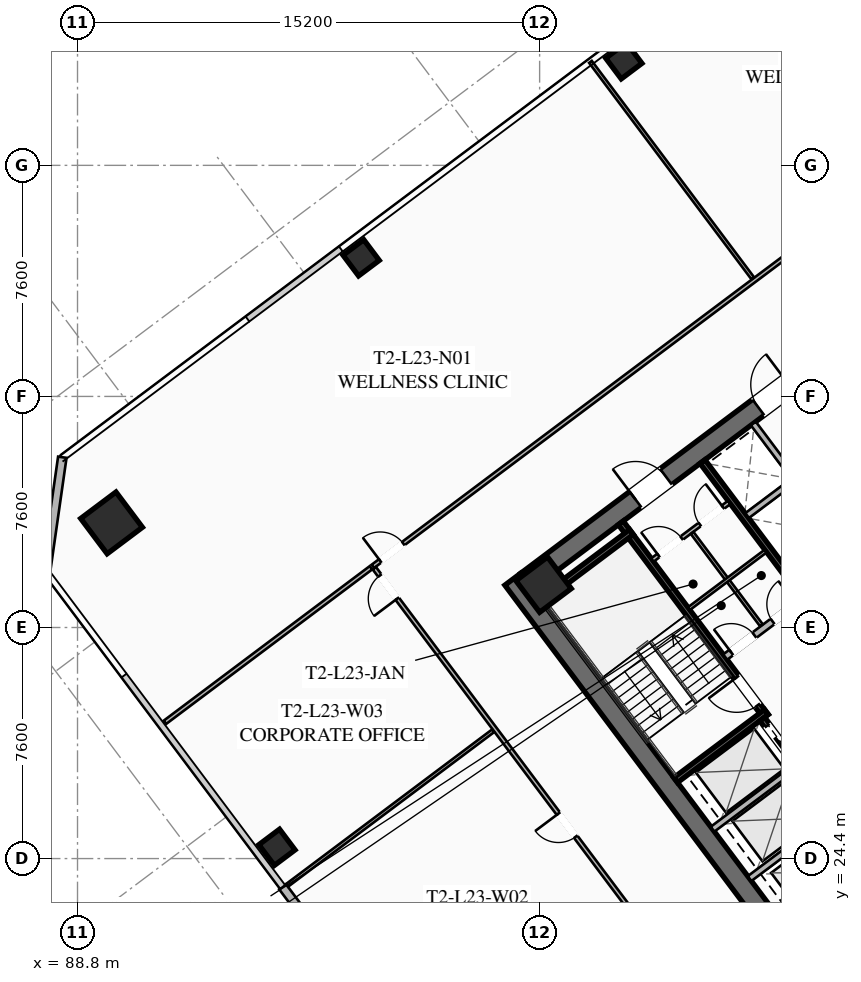
"""IFC4 building model, lengths in metres.
Left out: names, types, materials, properties, quantities, classifications, styles, units other than length and angle.
Written with IfcOpenShell. Run it as: python <this file> out.ifc"""

import sys

from ifc_helpers import new_model, si_unit, direction, frame, frame_2d, origin, origin_2d, place, context, subcontext, project, spatial, rectangle, hollow_rectangle, extrude, element, fill, save


model = new_model("IFC4")
c1 = context("Model", 3, precision=1e-05, world=origin(), true_north=direction((0.0, 1.0)))
c2 = subcontext(c1, "Body", "Model", "MODEL_VIEW")
j1 = project(units=[si_unit("LENGTHUNIT", "METRE"), si_unit("PLANEANGLEUNIT", "RADIAN")], contexts=[c1])
p1 = place(None, origin())
s1 = spatial("IfcSite", under=j1, at=p1, CompositionType="ELEMENT")
p2 = place(p1, origin())
s2 = spatial("IfcBuilding", under=s1, at=p2, CompositionType="ELEMENT")
p3 = place(p2, frame((0.0, 0.0, 88.5)))
s3 = spatial("IfcBuildingStorey", under=s2, at=p3, CompositionType="ELEMENT", Elevation=88.5)
p4 = place(p3, frame((112.476, 21.107, 0.0), z_axis=(0.0, 0.0, 1.0), x_axis=(-0.600005007985, 0.799996243986, 0.0)))
e1 = element("IfcWall", 1, at=p4, inside=s3, PredefinedType="SHEAR", context=c2, shape_type="SweptSolid", body=[
    extrude(rectangle(XDim=15.6, YDim=0.65, at=frame_2d((7.8, 0.0))), origin(), (0.0, 0.0, 1.0), 3.55),
])
p5 = place(p3, frame((103.571, 33.522, 0.0), z_axis=(0.0, 0.0, 1.0), x_axis=(0.799998028465, 0.600002628705, 0.0)))
e2 = element("IfcWall", 2, at=p5, inside=s3, PredefinedType="SHEAR", context=c2, shape_type="SweptSolid", body=[
    extrude(rectangle(XDim=14.86, YDim=0.65, at=frame_2d((7.43, 0.0))), origin(), (0.0, 0.0, 1.0), 3.55),
])
p6 = place(p5, frame((4.48, 0.0, 0.0)))
e3 = element("IfcOpeningElement", 3, at=p6, cuts=e2, PredefinedType="OPENING", context=c2, shape_type="SweptSolid", body=[
    extrude(rectangle(XDim=1.25, YDim=2.25, at=frame_2d((0.625, 1.125))), frame((0.0, 0.335, 0.0), z_axis=(0.0, -1.0, 0.0), x_axis=(1.0, 0.0, 0.0)), (0.0, 0.0, 1.0), 0.67),
])
p7 = place(p5, frame((9.53, 0.0, 0.0)))
e4 = element("IfcOpeningElement", 4, at=p7, cuts=e2, PredefinedType="OPENING", context=c2, shape_type="SweptSolid", body=[
    extrude(rectangle(XDim=1.25, YDim=2.25, at=frame_2d((0.625, 1.125))), frame((0.0, 0.335, 0.0), z_axis=(0.0, -1.0, 0.0), x_axis=(1.0, 0.0, 0.0)), (0.0, 0.0, 1.0), 0.67),
])
for number, where, z_axis, x_axis in (
    (5, (112.59, 22.13, 0.0), (0.0, 0.0, 1.0), (0.8, 0.6, 0.0)),
    (6, (104.13, 33.41, 0.0), (0.0, 0.0, 1.0), (0.8, 0.6, 0.0)),
):
    element("IfcColumn", number, at=place(p3, frame(where, z_axis=z_axis, x_axis=x_axis)), inside=s3, PredefinedType="COLUMN", context=c2, shape_type="SweptSolid", body=[
        extrude(hollow_rectangle(XDim=1.3, YDim=1.3, WallThickness=0.05, at=origin_2d()), origin(), (0.0, 0.0, 1.0), 3.35),
    ])
p8 = place(p3, frame((89.92, 35.44, 0.0), z_axis=(0.0, 0.0, 1.0), x_axis=(0.799999996291, 0.600000004945, 0.0)))
e7 = element("IfcColumn", 7, at=p8, inside=s3, PredefinedType="COLUMN", context=c2, shape_type="SweptSolid", body=[
    extrude(hollow_rectangle(XDim=1.45, YDim=1.45, WallThickness=0.055, at=origin_2d()), origin(), (0.0, 0.0, 1.0), 3.35),
])
for number, where, z_axis, x_axis in (
    (8, (106.77, 50.64, 0.0), (0.0, 0.0, 1.0), (0.8, 0.6, 0.0)),
    (9, (98.13, 44.16, 0.0), (0.0, 0.0, 1.0), (0.8, 0.6, 0.0)),
    (10, (95.36, 24.77, 0.0), (0.0, 0.0, 1.0), (0.8, 0.6, 0.0)),
):
    element("IfcColumn", number, at=place(p3, frame(where, z_axis=z_axis, x_axis=x_axis)), inside=s3, PredefinedType="COLUMN", context=c2, shape_type="SweptSolid", body=[
        extrude(hollow_rectangle(XDim=0.85, YDim=0.85, WallThickness=0.035, at=origin_2d()), origin(), (0.0, 0.0, 1.0), 3.35),
    ])
p9 = place(p3, frame((100.646, 16.672, 0.0), z_axis=(0.0, 0.0, 1.0), x_axis=(-0.600018382406, 0.799986212866, 0.0)))
e11 = element("IfcWall", 11, at=p9, inside=s3, PredefinedType="SOLIDWALL", context=c2, shape_type="SweptSolid", body=[
    extrude(rectangle(XDim=8.5, YDim=0.28, at=frame_2d((4.25, 0.0))), origin(), (0.0, 0.0, 1.0), 3.35),
])
p10 = place(p9, frame((3.6, 0.0, 0.0)))
e12 = element("IfcOpeningElement", 12, at=p10, cuts=e11, PredefinedType="OPENING", context=c2, shape_type="SweptSolid", body=[
    extrude(rectangle(XDim=1.3, YDim=2.15, at=frame_2d((0.65, 1.075))), frame((0.0, 0.15, 0.0), z_axis=(0.0, -1.0, 0.0), x_axis=(1.0, 0.0, 0.0)), (0.0, 0.0, 1.0), 0.3),
])
p11 = place(p9, frame((1.46, 0.0, 0.85)))
e13 = element("IfcOpeningElement", 13, at=p11, cuts=e11, PredefinedType="OPENING", context=c2, shape_type="SweptSolid", body=[
    extrude(rectangle(XDim=1.8, YDim=1.92, at=frame_2d((0.9, 0.96))), frame((0.0, 0.15, 0.0), z_axis=(0.0, -1.0, 0.0), x_axis=(1.0, 0.0, 0.0)), (0.0, 0.0, 1.0), 0.3),
])
p12 = place(p3, frame((87.76, 33.82, 0.0), z_axis=(0.0, 0.0, 1.0), x_axis=(0.141430307517, 0.989948214866, 0.0)))
e14 = element("IfcWall", 14, at=p12, inside=s3, PredefinedType="SOLIDWALL", context=c2, shape_type="SweptSolid", body=[
    extrude(rectangle(XDim=3.818, YDim=0.28, at=frame_2d((1.909, 0.0))), origin(), (0.0, 0.0, 1.0), 3.35),
])
p13 = place(p3, frame((111.44, 29.08, 0.0), z_axis=(0.0, 0.0, 1.0), x_axis=(-0.600009827119, 0.799992629566, 0.0)))
e15 = element("IfcWall", 15, at=p13, inside=s3, PredefinedType="SHEAR", context=c2, shape_type="SweptSolid", body=[
    extrude(rectangle(XDim=7.95, YDim=0.2, at=frame_2d((3.975, 0.0))), origin(), (0.0, 0.0, 1.0), 3.35),
])
p14 = place(p13, frame((0.45, 0.0, 0.0)))
e16 = element("IfcOpeningElement", 16, at=p14, cuts=e15, PredefinedType="OPENING", context=c2, shape_type="SweptSolid", body=[
    extrude(rectangle(XDim=1.15, YDim=2.2, at=frame_2d((0.575, 1.1))), frame((0.0, 0.11, 0.0), z_axis=(0.0, -1.0, 0.0), x_axis=(1.0, 0.0, 0.0)), (0.0, 0.0, 1.0), 0.22),
])
for number, where, z_axis, x_axis in (
    (17, (108.476, 26.982, 0.0), (0.0, 0.0, 1.0), (0.8, 0.6, 0.0)),
    (18, (104.036, 32.902, 0.0), (0.0, 0.0, 1.0), (0.8, 0.6, 0.0)),
):
    element("IfcWall", number, at=place(p3, frame(where, z_axis=z_axis, x_axis=x_axis)), inside=s3, PredefinedType="SHEAR", context=c2, shape_type="SweptSolid", body=[
        extrude(rectangle(XDim=3.73, YDim=0.2, at=frame_2d((1.865, 0.0))), origin(), (0.0, 0.0, 1.0), 3.35),
    ])
p15 = place(p3, frame((117.938, 26.016, 0.0), z_axis=(0.0, 0.0, 1.0), x_axis=(-0.600005463273, 0.799995902516, 0.0)))
e19 = element("IfcWall", 19, at=p15, inside=s3, PredefinedType="SHEAR", context=c2, shape_type="SweptSolid", body=[
    extrude(rectangle(XDim=14.3, YDim=0.2, at=frame_2d((7.15, 0.0))), origin(), (0.0, 0.0, 1.0), 3.35),
])
p16 = place(p3, frame((110.104, 31.028, 0.0), z_axis=(0.0, 0.0, 1.0), x_axis=(0.800018601094, 0.59997519774, 0.0)))
e20 = element("IfcWall", 20, at=p16, inside=s3, PredefinedType="SOLIDWALL", context=c2, shape_type="SweptSolid", body=[
    extrude(rectangle(XDim=3.15, YDim=0.22, at=frame_2d((1.575, 0.0))), origin(), (0.0, 0.0, 1.0), 2.703),
])
p17 = place(p16, frame((0.25, 0.0, 0.0)))
e21 = element("IfcOpeningElement", 21, at=p17, cuts=e20, PredefinedType="OPENING", context=c2, shape_type="SweptSolid", body=[
    extrude(rectangle(XDim=0.95, YDim=2.05, at=frame_2d((0.475, 1.025))), frame((0.0, 0.12, 0.0), z_axis=(0.0, -1.0, 0.0), x_axis=(1.0, 0.0, 0.0)), (0.0, 0.0, 1.0), 0.24),
])
p18 = place(p16, frame((1.95, 0.0, 0.0)))
e22 = element("IfcOpeningElement", 22, at=p18, cuts=e20, PredefinedType="OPENING", context=c2, shape_type="SweptSolid", body=[
    extrude(rectangle(XDim=0.95, YDim=2.05, at=frame_2d((0.475, 1.025))), frame((0.0, 0.12, 0.0), z_axis=(0.0, -1.0, 0.0), x_axis=(1.0, 0.0, 0.0)), (0.0, 0.0, 1.0), 0.24),
])
p19 = place(p3, frame((115.13, 23.91, 0.0), z_axis=(0.0, 0.0, 1.0), x_axis=(-0.599975393228, 0.800018454488, 0.0)))
e23 = element("IfcWall", 23, at=p19, inside=s3, PredefinedType="SHEAR", context=c2, shape_type="SweptSolid", body=[
    extrude(rectangle(XDim=6.35, YDim=0.2, at=frame_2d((3.175, 0.0))), origin(), (0.0, 0.0, 1.0), 3.35),
])
p20 = place(p19, frame((4.775, 0.0, 0.0)))
e24 = element("IfcOpeningElement", 24, at=p20, cuts=e23, PredefinedType="OPENING", context=c2, shape_type="SweptSolid", body=[
    extrude(rectangle(XDim=1.3, YDim=2.25, at=frame_2d((0.65, 1.125))), frame((0.0, 0.11, 0.0), z_axis=(0.0, -1.0, 0.0), x_axis=(1.0, 0.0, 0.0)), (0.0, 0.0, 1.0), 0.22),
])
p21 = place(p19, frame((2.775, 0.0, 0.0)))
e25 = element("IfcOpeningElement", 25, at=p21, cuts=e23, PredefinedType="OPENING", context=c2, shape_type="SweptSolid", body=[
    extrude(rectangle(XDim=1.3, YDim=2.25, at=frame_2d((0.65, 1.125))), frame((0.0, 0.11, 0.0), z_axis=(0.0, -1.0, 0.0), x_axis=(1.0, 0.0, 0.0)), (0.0, 0.0, 1.0), 0.22),
])
p22 = place(p19, frame((0.575, 0.0, 0.0)))
e26 = element("IfcOpeningElement", 26, at=p22, cuts=e23, PredefinedType="OPENING", context=c2, shape_type="SweptSolid", body=[
    extrude(rectangle(XDim=1.3, YDim=2.25, at=frame_2d((0.65, 1.125))), frame((0.0, 0.11, 0.0), z_axis=(0.0, -1.0, 0.0), x_axis=(1.0, 0.0, 0.0)), (0.0, 0.0, 1.0), 0.22),
])
for number, where, z_axis, x_axis in (
    (27, (110.906, 23.742, 0.0), (0.0, 0.0, 1.0), (0.8, 0.6, 0.0)),
    (28, (109.688, 25.366, 0.0), (0.0, 0.0, 1.0), (0.8, 0.6, 0.0)),
):
    element("IfcWall", number, at=place(p3, frame(where, z_axis=z_axis, x_axis=x_axis)), inside=s3, PredefinedType="SOLIDWALL", context=c2, shape_type="SweptSolid", body=[
        extrude(rectangle(XDim=3.38, YDim=0.2, at=frame_2d((1.69, 0.0))), origin(), (0.0, 0.0, 1.0), 3.35),
    ])
p23 = place(p3, frame((107.71, 34.22, 0.0), z_axis=(0.0, 0.0, 1.0), x_axis=(0.799981399002, 0.60002480053, 0.0)))
e29 = element("IfcWall", 29, at=p23, inside=s3, PredefinedType="PARTITIONING", context=c2, shape_type="SweptSolid", body=[
    extrude(rectangle(XDim=3.15, YDim=0.135, at=frame_2d((1.575, 0.0))), origin(), (0.0, 0.0, 1.0), 2.703),
])
p24 = place(p23, frame((0.25, 0.0, 0.0)))
e30 = element("IfcOpeningElement", 30, at=p24, cuts=e29, PredefinedType="OPENING", context=c2, shape_type="SweptSolid", body=[
    extrude(rectangle(XDim=0.95, YDim=2.05, at=frame_2d((0.475, 1.025))), frame((0.0, 0.077, 0.0), z_axis=(0.0, -1.0, 0.0), x_axis=(1.0, 0.0, 0.0)), (0.0, 0.0, 1.0), 0.155),
])
p25 = place(p23, frame((1.95, 0.0, 0.0)))
e31 = element("IfcOpeningElement", 31, at=p25, cuts=e29, PredefinedType="OPENING", context=c2, shape_type="SweptSolid", body=[
    extrude(rectangle(XDim=0.95, YDim=2.05, at=frame_2d((0.475, 1.025))), frame((0.0, 0.077, 0.0), z_axis=(0.0, -1.0, 0.0), x_axis=(1.0, 0.0, 0.0)), (0.0, 0.0, 1.0), 0.155),
])
p26 = place(p3, frame((111.296, 32.072, 0.0), z_axis=(0.0, 0.0, 1.0), x_axis=(-0.59995887973, 0.800030838552, 0.0)))
e32 = element("IfcWall", 32, at=p26, inside=s3, PredefinedType="PARTITIONING", context=c2, shape_type="SweptSolid", body=[
    extrude(rectangle(XDim=3.8, YDim=0.11, at=frame_2d((1.9, 0.0))), origin(), (0.0, 0.0, 1.0), 2.703),
])
p27 = place(p3, frame((108.91, 32.62, 0.0), z_axis=(0.0, 0.0, 1.0), x_axis=(0.800018601094, 0.59997519774, 0.0)))
e33 = element("IfcWall", 33, at=p27, inside=s3, PredefinedType="PARTITIONING", context=c2, shape_type="SweptSolid", body=[
    extrude(rectangle(XDim=3.15, YDim=0.11, at=frame_2d((1.575, 0.0))), origin(), (0.0, 0.0, 1.0), 2.703),
])
p28 = place(p3, frame((115.11, 33.27, 0.0), z_axis=(0.0, 0.0, 1.0), x_axis=(-0.600011488909, 0.79999138319, 0.0)))
e34 = element("IfcWall", 34, at=p28, inside=s3, PredefinedType="SOLIDWALL", context=c2, shape_type="SweptSolid", body=[
    extrude(rectangle(XDim=6.8, YDim=0.2, at=frame_2d((3.4, 0.0))), origin(), (0.0, 0.0, 1.0), 3.35),
])
p29 = place(p3, frame((110.826, 35.682, 0.0), z_axis=(0.0, 0.0, 1.0), x_axis=(0.799984418148, 0.600020775241, 0.0)))
e35 = element("IfcWall", 35, at=p29, inside=s3, PredefinedType="SOLIDWALL", context=c2, shape_type="SweptSolid", body=[
    extrude(rectangle(XDim=1.88, YDim=0.2, at=frame_2d((0.94, 0.0))), origin(), (0.0, 0.0, 1.0), 3.35),
])
p30 = place(p3, frame((98.516, 34.012, 0.0), z_axis=(0.0, 0.0, 1.0), x_axis=(0.8, 0.6, 0.0)))
e36 = element("IfcWall", 36, at=p30, inside=s3, PredefinedType="PARTITIONING", context=c2, shape_type="SweptSolid", body=[
    extrude(rectangle(XDim=28.23, YDim=0.135, at=frame_2d((14.115, 0.0))), origin(), (0.0, 0.0, 1.0), 2.703),
])
p31 = place(p30, frame((0.3, 0.0, 0.0)))
e37 = element("IfcOpeningElement", 37, at=p31, cuts=e36, PredefinedType="OPENING", context=c2, shape_type="SweptSolid", body=[
    extrude(rectangle(XDim=0.95, YDim=2.05, at=frame_2d((0.475, 1.025))), frame((0.0, 0.077, 0.0), z_axis=(0.0, -1.0, 0.0), x_axis=(1.0, 0.0, 0.0)), (0.0, 0.0, 1.0), 0.155),
])
p32 = place(p30, frame((26.98, 0.0, 0.0)))
e38 = element("IfcOpeningElement", 38, at=p32, cuts=e36, PredefinedType="OPENING", context=c2, shape_type="SweptSolid", body=[
    extrude(rectangle(XDim=0.95, YDim=2.05, at=frame_2d((0.475, 1.025))), frame((0.0, 0.077, 0.0), z_axis=(0.0, -1.0, 0.0), x_axis=(1.0, 0.0, 0.0)), (0.0, 0.0, 1.0), 0.155),
])
p33 = place(p3, frame((111.012, 43.484, 0.0), z_axis=(0.0, 0.0, 1.0), x_axis=(-0.599982443676, 0.800013166942, 0.0)))
e39 = element("IfcWall", 39, at=p33, inside=s3, PredefinedType="PARTITIONING", context=c2, shape_type="SweptSolid", body=[
    extrude(rectangle(XDim=8.9, YDim=0.11, at=frame_2d((4.45, 0.0))), origin(), (0.0, 0.0, 1.0), 2.703),
])
p34 = place(p3, frame((111.95, 16.1, 0.0), z_axis=(0.0, 0.0, 1.0), x_axis=(-0.600001750902, 0.799998686821, 0.0)))
e40 = element("IfcWall", 40, at=p34, inside=s3, PredefinedType="PARTITIONING", context=c2, shape_type="SweptSolid", body=[
    extrude(rectangle(XDim=22.31, YDim=0.135, at=frame_2d((11.155, 0.0))), origin(), (0.0, 0.0, 1.0), 2.703),
])
p35 = place(p34, frame((0.3, 0.0, 0.0)))
e41 = element("IfcOpeningElement", 41, at=p35, cuts=e40, PredefinedType="OPENING", context=c2, shape_type="SweptSolid", body=[
    extrude(rectangle(XDim=0.95, YDim=2.05, at=frame_2d((0.475, 1.025))), frame((0.0, 0.077, 0.0), z_axis=(0.0, -1.0, 0.0), x_axis=(1.0, 0.0, 0.0)), (0.0, 0.0, 1.0), 0.155),
])
p36 = place(p34, frame((11.272, 0.0, 0.0)))
e42 = element("IfcOpeningElement", 42, at=p36, cuts=e40, PredefinedType="OPENING", context=c2, shape_type="SweptSolid", body=[
    extrude(rectangle(XDim=0.95, YDim=2.05, at=frame_2d((0.475, 1.025))), frame((0.0, 0.077, 0.0), z_axis=(0.0, -1.0, 0.0), x_axis=(1.0, 0.0, 0.0)), (0.0, 0.0, 1.0), 0.155),
])
p37 = place(p34, frame((21.06, 0.0, 0.0)))
e43 = element("IfcOpeningElement", 43, at=p37, cuts=e40, PredefinedType="OPENING", context=c2, shape_type="SweptSolid", body=[
    extrude(rectangle(XDim=0.95, YDim=2.05, at=frame_2d((0.475, 1.025))), frame((0.0, 0.077, 0.0), z_axis=(0.0, -1.0, 0.0), x_axis=(1.0, 0.0, 0.0)), (0.0, 0.0, 1.0), 0.155),
])
p38 = place(p3, frame((98.452, 33.964, 0.0), z_axis=(0.0, 0.0, 1.0), x_axis=(-0.799993082085, -0.600009223776, 0.0)))
e44 = element("IfcWall", 44, at=p38, inside=s3, PredefinedType="PARTITIONING", context=c2, shape_type="SweptSolid", body=[
    extrude(rectangle(XDim=8.47, YDim=0.135, at=frame_2d((4.235, 0.0))), origin(), (0.0, 0.0, 1.0), 2.703),
])
p39 = place(p3, frame((95.696, 23.522, 0.0), z_axis=(0.0, 0.0, 1.0), x_axis=(0.799993082085, 0.600009223776, 0.0)))
e45 = element("IfcWall", 45, at=p39, inside=s3, PredefinedType="PARTITIONING", context=c2, shape_type="SweptSolid", body=[
    extrude(rectangle(XDim=8.47, YDim=0.11, at=frame_2d((4.235, 0.0))), origin(), (0.0, 0.0, 1.0), 2.703),
])
p40 = place(p6, origin())
e46 = element("IfcDoor", 46, at=p40, inside=s3, OperationType="SINGLE_SWING_LEFT", PredefinedType="DOOR", context=c2, shape_type="SweptSolid", body=[
    extrude(rectangle(XDim=1.25, YDim=2.25, at=frame_2d((0.625, 1.125))), frame((0.0, 0.025, 0.0), z_axis=(0.0, -1.0, 0.0), x_axis=(1.0, 0.0, 0.0)), (0.0, 0.0, 1.0), 0.05),
])
fill(e3, e46)
p41 = place(p7, origin())
e47 = element("IfcDoor", 47, at=p41, inside=s3, OperationType="SINGLE_SWING_RIGHT", PredefinedType="DOOR", context=c2, shape_type="SweptSolid", body=[
    extrude(rectangle(XDim=1.25, YDim=2.25, at=frame_2d((0.625, 1.125))), frame((0.0, 0.025, 0.0), z_axis=(0.0, -1.0, 0.0), x_axis=(1.0, 0.0, 0.0)), (0.0, 0.0, 1.0), 0.05),
])
fill(e4, e47)
p42 = place(p14, origin())
e48 = element("IfcDoor", 48, at=p42, inside=s3, OperationType="SINGLE_SWING_RIGHT", PredefinedType="DOOR", context=c2, shape_type="SweptSolid", body=[
    extrude(rectangle(XDim=1.15, YDim=2.2, at=frame_2d((0.575, 1.1))), frame((0.0, 0.025, 0.0), z_axis=(0.0, -1.0, 0.0), x_axis=(1.0, 0.0, 0.0)), (0.0, 0.0, 1.0), 0.05),
])
fill(e16, e48)
p43 = place(p24, origin())
e49 = element("IfcDoor", 49, at=p43, inside=s3, OperationType="SINGLE_SWING_LEFT", PredefinedType="DOOR", context=c2, shape_type="SweptSolid", body=[
    extrude(rectangle(XDim=0.95, YDim=2.05, at=frame_2d((0.475, 1.025))), frame((0.0, 0.025, 0.0), z_axis=(0.0, -1.0, 0.0), x_axis=(1.0, 0.0, 0.0)), (0.0, 0.0, 1.0), 0.05),
])
fill(e30, e49)
p44 = place(p25, origin())
e50 = element("IfcDoor", 50, at=p44, inside=s3, OperationType="SINGLE_SWING_RIGHT", PredefinedType="DOOR", context=c2, shape_type="SweptSolid", body=[
    extrude(rectangle(XDim=0.95, YDim=2.05, at=frame_2d((0.475, 1.025))), frame((0.0, 0.025, 0.0), z_axis=(0.0, -1.0, 0.0), x_axis=(1.0, 0.0, 0.0)), (0.0, 0.0, 1.0), 0.05),
])
fill(e31, e50)
p45 = place(p17, origin())
e51 = element("IfcDoor", 51, at=p45, inside=s3, OperationType="SINGLE_SWING_LEFT", PredefinedType="DOOR", context=c2, shape_type="SweptSolid", body=[
    extrude(rectangle(XDim=0.95, YDim=2.05, at=frame_2d((0.475, 1.025))), frame((0.0, 0.025, 0.0), z_axis=(0.0, -1.0, 0.0), x_axis=(1.0, 0.0, 0.0)), (0.0, 0.0, 1.0), 0.05),
])
fill(e21, e51)
p46 = place(p18, origin())
e52 = element("IfcDoor", 52, at=p46, inside=s3, OperationType="SINGLE_SWING_RIGHT", PredefinedType="DOOR", context=c2, shape_type="SweptSolid", body=[
    extrude(rectangle(XDim=0.95, YDim=2.05, at=frame_2d((0.475, 1.025))), frame((0.0, 0.025, 0.0), z_axis=(0.0, -1.0, 0.0), x_axis=(1.0, 0.0, 0.0)), (0.0, 0.0, 1.0), 0.05),
])
fill(e22, e52)
p47 = place(p31, origin())
e53 = element("IfcDoor", 53, at=p47, inside=s3, OperationType="SINGLE_SWING_LEFT", PredefinedType="DOOR", context=c2, shape_type="SweptSolid", body=[
    extrude(rectangle(XDim=0.95, YDim=2.05, at=frame_2d((0.475, 1.025))), frame((0.0, 0.025, 0.0), z_axis=(0.0, -1.0, 0.0), x_axis=(1.0, 0.0, 0.0)), (0.0, 0.0, 1.0), 0.05),
])
fill(e37, e53)
p48 = place(p36, origin())
e54 = element("IfcDoor", 54, at=p48, inside=s3, OperationType="SINGLE_SWING_RIGHT", PredefinedType="DOOR", context=c2, shape_type="SweptSolid", body=[
    extrude(rectangle(XDim=0.95, YDim=2.05, at=frame_2d((0.475, 1.025))), frame((0.0, 0.025, 0.0), z_axis=(0.0, -1.0, 0.0), x_axis=(1.0, 0.0, 0.0)), (0.0, 0.0, 1.0), 0.05),
])
fill(e42, e54)
p49 = place(p37, origin())
e55 = element("IfcDoor", 55, at=p49, inside=s3, OperationType="SINGLE_SWING_LEFT", PredefinedType="DOOR", context=c2, shape_type="SweptSolid", body=[
    extrude(rectangle(XDim=0.95, YDim=2.05, at=frame_2d((0.475, 1.025))), frame((0.0, 0.025, 0.0), z_axis=(0.0, -1.0, 0.0), x_axis=(1.0, 0.0, 0.0)), (0.0, 0.0, 1.0), 0.05),
])
fill(e43, e55)
p50 = place(p20, origin())
e56 = element("IfcDoor", 56, at=p50, inside=s3, OperationType="SLIDING_TO_LEFT", PredefinedType="DOOR", context=c2, shape_type="SweptSolid", body=[
    extrude(rectangle(XDim=1.3, YDim=2.25, at=frame_2d((0.65, 1.125))), frame((0.0, 0.025, 0.0), z_axis=(0.0, -1.0, 0.0), x_axis=(1.0, 0.0, 0.0)), (0.0, 0.0, 1.0), 0.05),
])
fill(e24, e56)
save(model, sys.argv[1])
